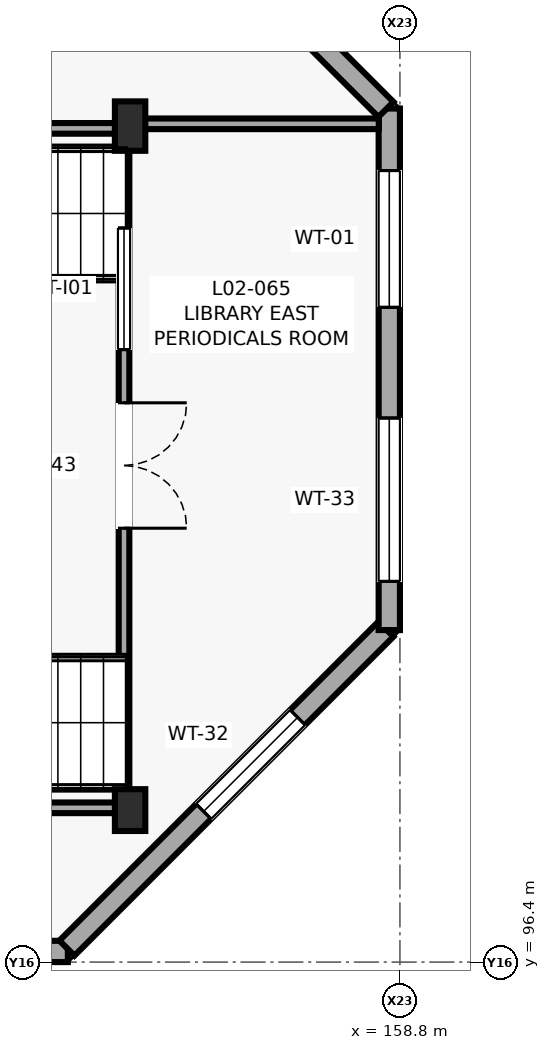
"""IFC4 building model, lengths in metres.
Left out: names, types, materials, properties, quantities, classifications, styles, units other than length and angle.
Written with IfcOpenShell. Run it as: python <this file> out.ifc"""

import sys

from ifc_helpers import new_model, si_unit, direction, frame, frame_2d, origin, origin_2d, place, context, subcontext, project, spatial, rectangle, extrude, element, fill, save


model = new_model("IFC4")
c1 = context("Model", 3, precision=1e-05, world=origin(), true_north=direction((0.0, 1.0)))
c2 = subcontext(c1, "Body", "Model", "MODEL_VIEW")
j1 = project(units=[si_unit("LENGTHUNIT", "METRE"), si_unit("PLANEANGLEUNIT", "RADIAN")], contexts=[c1])
p1 = place(None, origin())
s1 = spatial("IfcSite", under=j1, at=p1, CompositionType="ELEMENT")
p2 = place(p1, origin())
s2 = spatial("IfcBuilding", under=s1, at=p2, CompositionType="ELEMENT")
p3 = place(p2, frame((0.0, 0.0, 8.2)))
s3 = spatial("IfcBuildingStorey", under=s2, at=p3, CompositionType="ELEMENT", Elevation=8.2)
p4 = place(p3, frame((155.25, 98.4, 0.0), z_axis=(0.0, 0.0, 1.0), x_axis=(1.0, 0.0, 0.0)))
e1 = element("IfcColumn", 1, at=p4, inside=s3, PredefinedType="COLUMN", context=c2, shape_type="SweptSolid", body=[
    extrude(rectangle(XDim=0.4, YDim=0.55, at=origin_2d()), origin(), (0.0, 0.0, 1.0), 4.0),
])
p5 = place(p3, frame((155.25, 107.4, 0.0), z_axis=(0.0, 0.0, 1.0), x_axis=(1.0, 0.0, 0.0)))
e2 = element("IfcColumn", 2, at=p5, inside=s3, PredefinedType="COLUMN", context=c2, shape_type="SweptSolid", body=[
    extrude(rectangle(XDim=0.4, YDim=0.65, at=origin_2d()), origin(), (0.0, 0.0, 1.0), 4.0),
])
p6 = place(p3, frame((138.276, 96.54, 0.0), z_axis=(0.0, 0.0, 1.0), x_axis=(1.0, 0.0, 0.0)))
e3 = element("IfcWall", 3, at=p6, inside=s3, PredefinedType="SOLIDWALL", context=c2, shape_type="SweptSolid", body=[
    extrude(rectangle(XDim=16.155, YDim=0.28, at=frame_2d((8.078, 0.0))), origin(), (0.0, 0.0, 1.0), 2.965),
])
p7 = place(p6, frame((1.019, 0.0, 0.725)))
e4 = element("IfcOpeningElement", 4, at=p7, cuts=e3, PredefinedType="OPENING", context=c2, shape_type="SweptSolid", body=[
    extrude(rectangle(XDim=2.0, YDim=2.1, at=frame_2d((1.0, 1.05))), frame((0.0, 0.15, 0.0), z_axis=(0.0, -1.0, 0.0), x_axis=(1.0, 0.0, 0.0)), (0.0, 0.0, 1.0), 0.3),
])
p8 = place(p6, frame((4.758, 0.0, 1.05)))
e5 = element("IfcOpeningElement", 5, at=p8, cuts=e3, PredefinedType="OPENING", context=c2, shape_type="SweptSolid", body=[
    extrude(rectangle(XDim=0.9, YDim=1.5, at=frame_2d((0.45, 0.75))), frame((0.0, 0.15, 0.0), z_axis=(0.0, -1.0, 0.0), x_axis=(1.0, 0.0, 0.0)), (0.0, 0.0, 1.0), 0.3),
])
p9 = place(p6, frame((9.547, 0.0, 0.725)))
e6 = element("IfcOpeningElement", 6, at=p9, cuts=e3, PredefinedType="OPENING", context=c2, shape_type="SweptSolid", body=[
    extrude(rectangle(XDim=1.1, YDim=2.1, at=frame_2d((0.55, 1.05))), frame((0.0, 0.15, 0.0), z_axis=(0.0, -1.0, 0.0), x_axis=(1.0, 0.0, 0.0)), (0.0, 0.0, 1.0), 0.3),
])
p10 = place(p6, frame((13.811, 0.0, 0.85)))
e7 = element("IfcOpeningElement", 7, at=p10, cuts=e3, PredefinedType="OPENING", context=c2, shape_type="SweptSolid", body=[
    extrude(rectangle(XDim=1.55, YDim=1.85, at=frame_2d((0.775, 0.925))), frame((0.0, 0.15, 0.0), z_axis=(0.0, -1.0, 0.0), x_axis=(1.0, 0.0, 0.0)), (0.0, 0.0, 1.0), 0.3),
])
p11 = place(p3, frame((154.419, 96.584, 0.0), z_axis=(0.0, 0.0, 1.0), x_axis=(0.707106781187, 0.707106781187, 0.0)))
e8 = element("IfcWall", 8, at=p11, inside=s3, PredefinedType="SOLIDWALL", context=c2, shape_type="SweptSolid", body=[
    extrude(rectangle(XDim=5.936, YDim=0.28, at=frame_2d((2.968, 0.0))), origin(), (0.0, 0.0, 1.0), 3.78),
])
p12 = place(p11, frame((2.543, 0.0, 0.75)))
e9 = element("IfcOpeningElement", 9, at=p12, cuts=e8, PredefinedType="OPENING", context=c2, shape_type="SweptSolid", body=[
    extrude(rectangle(XDim=1.75, YDim=2.05, at=frame_2d((0.875, 1.025))), frame((0.0, 0.15, 0.0), z_axis=(0.0, -1.0, 0.0), x_axis=(1.0, 0.0, 0.0)), (0.0, 0.0, 1.0), 0.3),
])
p13 = place(p3, frame((158.66, 100.769, 0.0), z_axis=(0.0, 0.0, 1.0), x_axis=(0.0, 1.0, 0.0)))
e10 = element("IfcWall", 10, at=p13, inside=s3, PredefinedType="SOLIDWALL", context=c2, shape_type="SweptSolid", body=[
    extrude(rectangle(XDim=6.862, YDim=0.28, at=frame_2d((3.431, 0.0))), origin(), (0.0, 0.0, 1.0), 3.78),
])
p14 = place(p13, frame((0.64, 0.0, 0.85)))
e11 = element("IfcOpeningElement", 11, at=p14, cuts=e10, PredefinedType="OPENING", context=c2, shape_type="SweptSolid", body=[
    extrude(rectangle(XDim=2.15, YDim=1.95, at=frame_2d((1.075, 0.975))), frame((0.0, 0.15, 0.0), z_axis=(0.0, -1.0, 0.0), x_axis=(1.0, 0.0, 0.0)), (0.0, 0.0, 1.0), 0.3),
])
p15 = place(p13, frame((4.246, 0.0, 0.85)))
e12 = element("IfcOpeningElement", 12, at=p15, cuts=e10, PredefinedType="OPENING", context=c2, shape_type="SweptSolid", body=[
    extrude(rectangle(XDim=1.8, YDim=1.8, at=frame_2d((0.9, 0.9))), frame((0.0, 0.15, 0.0), z_axis=(0.0, -1.0, 0.0), x_axis=(1.0, 0.0, 0.0)), (0.0, 0.0, 1.0), 0.3),
])
p16 = place(p3, frame((158.616, 107.619, 0.0), z_axis=(0.0, 0.0, 1.0), x_axis=(-0.707106781187, 0.707106781187, 0.0)))
e13 = element("IfcWall", 13, at=p16, inside=s3, PredefinedType="SOLIDWALL", context=c2, shape_type="SweptSolid", body=[
    extrude(rectangle(XDim=5.936, YDim=0.28, at=frame_2d((2.968, 0.0))), origin(), (0.0, 0.0, 1.0), 3.78),
])
p17 = place(p16, frame((1.918, 0.0, 0.85)))
e14 = element("IfcOpeningElement", 14, at=p17, cuts=e13, PredefinedType="OPENING", context=c2, shape_type="SweptSolid", body=[
    extrude(rectangle(XDim=2.1, YDim=1.8, at=frame_2d((1.05, 0.9))), frame((0.0, 0.15, 0.0), z_axis=(0.0, -1.0, 0.0), x_axis=(1.0, 0.0, 0.0)), (0.0, 0.0, 1.0), 0.3),
])
p18 = place(p3, frame((137.238, 98.43, 0.0), z_axis=(0.0, 0.0, 1.0), x_axis=(1.0, 0.0, 0.0)))
e15 = element("IfcWall", 15, at=p18, inside=s3, PredefinedType="PARTITIONING", context=c2, shape_type="SweptSolid", body=[
    extrude(rectangle(XDim=17.932, YDim=0.14, at=frame_2d((8.966, 0.0))), origin(), (0.0, 0.0, 1.0), 3.78),
])
p19 = place(p3, frame((155.17, 98.498, 0.0), z_axis=(0.0, 0.0, 1.0), x_axis=(0.0, 1.0, 0.0)))
e16 = element("IfcWall", 16, at=p19, inside=s3, PredefinedType="PARTITIONING", context=c2, shape_type="SweptSolid", body=[
    extrude(rectangle(XDim=8.872, YDim=0.14, at=frame_2d((4.436, 0.0))), origin(), (0.0, 0.0, 1.0), 3.165),
])
p20 = place(p19, frame((3.611, 0.0, 0.0)))
e17 = element("IfcOpeningElement", 17, at=p20, cuts=e16, PredefinedType="OPENING", context=c2, shape_type="SweptSolid", body=[
    extrude(rectangle(XDim=1.65, YDim=2.32, at=frame_2d((0.825, 1.16))), frame((0.0, 0.08, 0.0), z_axis=(0.0, -1.0, 0.0), x_axis=(1.0, 0.0, 0.0)), (0.0, 0.0, 1.0), 0.16),
])
p21 = place(p19, frame((5.961, 0.0, 1.05)))
e18 = element("IfcOpeningElement", 18, at=p21, cuts=e16, PredefinedType="OPENING", context=c2, shape_type="SweptSolid", body=[
    extrude(rectangle(XDim=1.6, YDim=1.1, at=frame_2d((0.8, 0.55))), frame((0.0, 0.08, 0.0), z_axis=(0.0, -1.0, 0.0), x_axis=(1.0, 0.0, 0.0)), (0.0, 0.0, 1.0), 0.16),
])
p22 = place(p3, frame((155.102, 107.37, 0.0), z_axis=(0.0, 0.0, 1.0), x_axis=(-1.0, 0.0, 0.0)))
e19 = element("IfcWall", 19, at=p22, inside=s3, PredefinedType="PARTITIONING", context=c2, shape_type="SweptSolid", body=[
    extrude(rectangle(XDim=17.877, YDim=0.14, at=frame_2d((8.938, 0.0))), origin(), (0.0, 0.0, 1.0), 3.78),
])
p23 = place(p3, frame((155.17, 107.43, 0.0), z_axis=(0.0, 0.0, 1.0), x_axis=(1.0, 0.0, 0.0)))
e20 = element("IfcWall", 20, at=p23, inside=s3, PredefinedType="PARTITIONING", context=c2, shape_type="SweptSolid", body=[
    extrude(rectangle(XDim=3.352, YDim=0.14, at=frame_2d((1.676, 0.0))), origin(), (0.0, 0.0, 1.0), 3.715),
])
p24 = place(p12, origin())
e21 = element("IfcWindow", 21, at=p24, inside=s3, PartitioningType="SINGLE_PANEL", PredefinedType="WINDOW", context=c2, shape_type="SweptSolid", body=[
    extrude(rectangle(XDim=1.75, YDim=2.05, at=frame_2d((0.875, 1.025))), frame((0.0, 0.03, 0.0), z_axis=(0.0, -1.0, 0.0), x_axis=(1.0, 0.0, 0.0)), (0.0, 0.0, 1.0), 0.06),
])
fill(e9, e21)
p25 = place(p14, origin())
e22 = element("IfcWindow", 22, at=p25, inside=s3, PartitioningType="SINGLE_PANEL", PredefinedType="WINDOW", context=c2, shape_type="SweptSolid", body=[
    extrude(rectangle(XDim=2.15, YDim=1.95, at=frame_2d((1.075, 0.975))), frame((0.0, 0.03, 0.0), z_axis=(0.0, -1.0, 0.0), x_axis=(1.0, 0.0, 0.0)), (0.0, 0.0, 1.0), 0.06),
])
fill(e11, e22)
p26 = place(p15, origin())
e23 = element("IfcWindow", 23, at=p26, inside=s3, PartitioningType="SINGLE_PANEL", PredefinedType="WINDOW", context=c2, shape_type="SweptSolid", body=[
    extrude(rectangle(XDim=1.8, YDim=1.8, at=frame_2d((0.9, 0.9))), frame((0.0, 0.03, 0.0), z_axis=(0.0, -1.0, 0.0), x_axis=(1.0, 0.0, 0.0)), (0.0, 0.0, 1.0), 0.06),
])
fill(e12, e23)
p27 = place(p20, frame((1.65, 0.0, 0.0), z_axis=(0.0, 0.0, 1.0), x_axis=(-1.0, 0.0, 0.0)))
e24 = element("IfcDoor", 24, at=p27, inside=s3, OperationType="DOUBLE_DOOR_SINGLE_SWING", PredefinedType="DOOR", context=c2, shape_type="SweptSolid", body=[
    extrude(rectangle(XDim=1.65, YDim=2.32, at=frame_2d((0.825, 1.16))), frame((0.0, 0.025, 0.0), z_axis=(0.0, -1.0, 0.0), x_axis=(1.0, 0.0, 0.0)), (0.0, 0.0, 1.0), 0.05),
])
fill(e17, e24)
p28 = place(p21, origin())
e25 = element("IfcWindow", 25, at=p28, inside=s3, PartitioningType="SINGLE_PANEL", PredefinedType="WINDOW", context=c2, shape_type="SweptSolid", body=[
    extrude(rectangle(XDim=1.6, YDim=1.1, at=frame_2d((0.8, 0.55))), frame((0.0, 0.03, 0.0), z_axis=(0.0, -1.0, 0.0), x_axis=(1.0, 0.0, 0.0)), (0.0, 0.0, 1.0), 0.06),
])
fill(e18, e25)
save(model, sys.argv[1])
